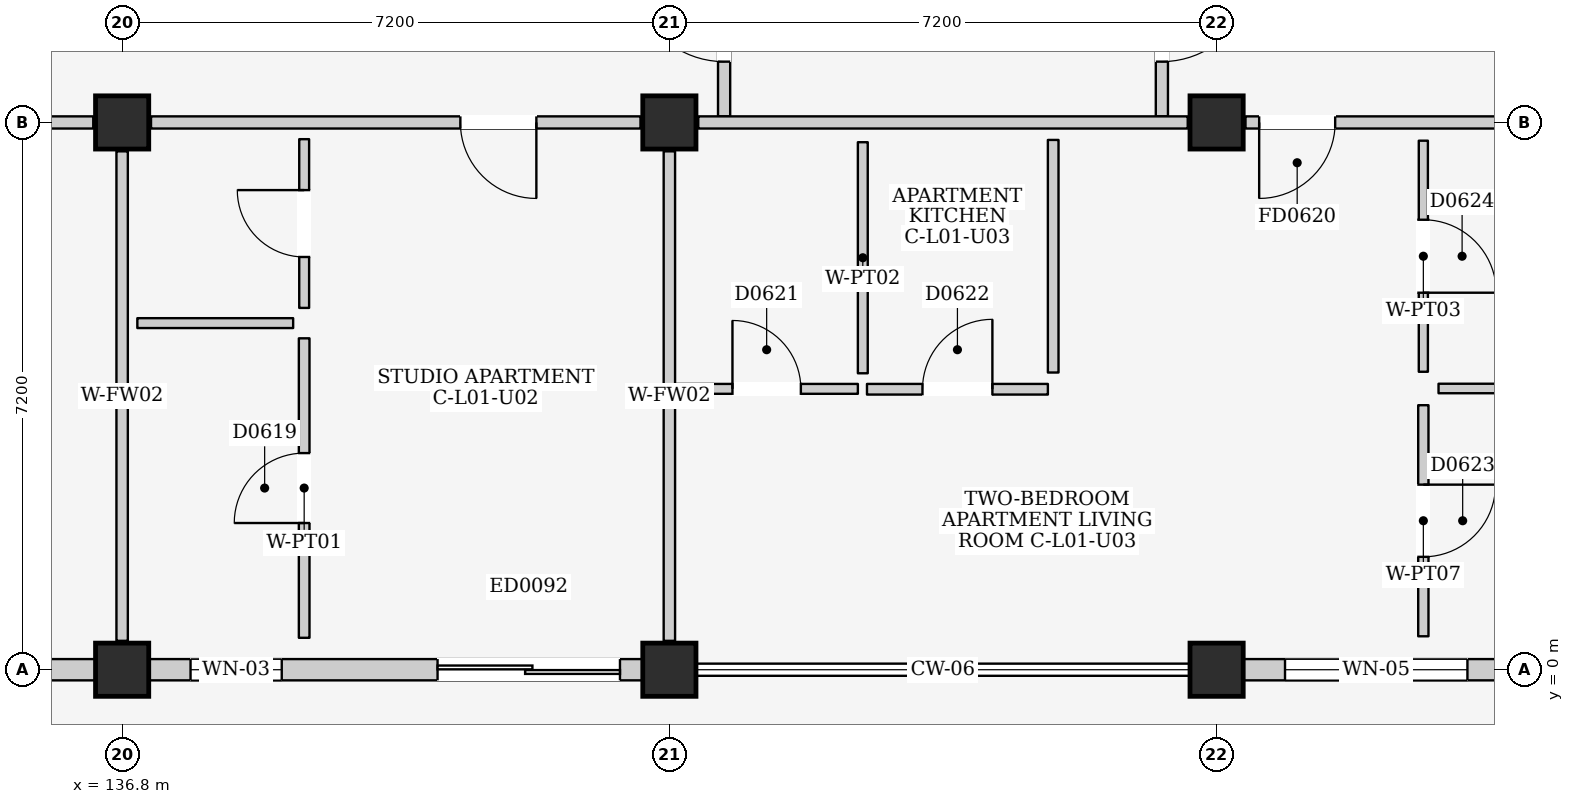
"""IFC4 building model, lengths in metres.
Left out: names, types, materials, properties, quantities, classifications, styles, units other than length and angle.
Written with IfcOpenShell. Run it as: python <this file> out.ifc"""

import sys

from ifc_helpers import new_model, si_unit, direction, frame, frame_2d, origin, origin_2d, place, context, subcontext, project, spatial, rectangle, extrude, element, fill, save


model = new_model("IFC4")
c1 = context("Model", 3, precision=1e-05, world=origin(), true_north=direction((0.0, 1.0)))
c2 = subcontext(c1, "Body", "Model", "MODEL_VIEW")
j1 = project(units=[si_unit("LENGTHUNIT", "METRE"), si_unit("PLANEANGLEUNIT", "RADIAN")], contexts=[c1])
p1 = place(None, origin())
s1 = spatial("IfcSite", under=j1, at=p1, CompositionType="ELEMENT")
p2 = place(p1, origin())
s2 = spatial("IfcBuilding", under=s1, at=p2, CompositionType="ELEMENT")
p3 = place(p2, frame((0.0, 0.0, 4.5)))
s3 = spatial("IfcBuildingStorey", under=s2, at=p3, CompositionType="ELEMENT", Elevation=4.5)
for number, where, z_axis, x_axis in (
    (1, (136.8, 0.0, 0.0), (0.0, 0.0, 1.0), (1.0, 0.0, 0.0)),
    (2, (136.8, 7.2, 0.0), (0.0, 0.0, 1.0), (1.0, 0.0, 0.0)),
    (3, (144.0, 0.0, 0.0), (0.0, 0.0, 1.0), (1.0, 0.0, 0.0)),
    (4, (144.0, 7.2, 0.0), (0.0, 0.0, 1.0), (1.0, 0.0, 0.0)),
    (5, (151.2, 0.0, 0.0), (0.0, 0.0, 1.0), (1.0, 0.0, 0.0)),
    (6, (151.2, 7.2, 0.0), (0.0, 0.0, 1.0), (1.0, 0.0, 0.0)),
):
    element("IfcColumn", number, at=place(p3, frame(where, z_axis=z_axis, x_axis=x_axis)), inside=s3, PredefinedType="COLUMN", context=c2, shape_type="SweptSolid", body=[
        extrude(rectangle(XDim=0.7, YDim=0.7, at=origin_2d()), origin(), (0.0, 0.0, 1.0), 4.5),
    ])
p4 = place(p3, frame((129.95, 0.0, 0.0), z_axis=(0.0, 0.0, 1.0), x_axis=(1.0, 0.0, 0.0)))
e7 = element("IfcWall", 7, at=p4, inside=s3, PredefinedType="ELEMENTEDWALL", context=c2, shape_type="SweptSolid", body=[
    extrude(rectangle(XDim=6.5, YDim=0.28, at=frame_2d((3.25, 0.0))), origin(), (0.0, 0.0, 1.0), 3.715),
])
p5 = place(p4, frame((3.85, 0.0, 0.0)))
e8 = element("IfcOpeningElement", 8, at=p5, cuts=e7, PredefinedType="OPENING", context=c2, shape_type="SweptSolid", body=[
    extrude(rectangle(XDim=1.5, YDim=2.12, at=frame_2d((0.75, 1.06))), frame((0.0, 0.155, 0.0), z_axis=(0.0, -1.0, 0.0), x_axis=(1.0, 0.0, 0.0)), (0.0, 0.0, 1.0), 0.31),
])
p6 = place(p4, frame((0.55, 0.0, 0.9)))
e9 = element("IfcOpeningElement", 9, at=p6, cuts=e7, PredefinedType="OPENING", context=c2, shape_type="SweptSolid", body=[
    extrude(rectangle(XDim=1.5, YDim=1.5, at=frame_2d((0.75, 0.75))), frame((0.0, 0.155, 0.0), z_axis=(0.0, -1.0, 0.0), x_axis=(1.0, 0.0, 0.0)), (0.0, 0.0, 1.0), 0.31),
])
p7 = place(p3, frame((137.15, 0.0, 0.0), z_axis=(0.0, 0.0, 1.0), x_axis=(1.0, 0.0, 0.0)))
e10 = element("IfcWall", 10, at=p7, inside=s3, PredefinedType="ELEMENTEDWALL", context=c2, shape_type="SweptSolid", body=[
    extrude(rectangle(XDim=6.5, YDim=0.28, at=frame_2d((3.25, 0.0))), origin(), (0.0, 0.0, 1.0), 3.715),
])
p8 = place(p7, frame((3.8, 0.0, 0.0)))
e11 = element("IfcOpeningElement", 11, at=p8, cuts=e10, PredefinedType="OPENING", context=c2, shape_type="SweptSolid", body=[
    extrude(rectangle(XDim=2.4, YDim=2.12, at=frame_2d((1.2, 1.06))), frame((0.0, 0.155, 0.0), z_axis=(0.0, -1.0, 0.0), x_axis=(1.0, 0.0, 0.0)), (0.0, 0.0, 1.0), 0.31),
])
p9 = place(p7, frame((0.55, 0.0, 0.9)))
e12 = element("IfcOpeningElement", 12, at=p9, cuts=e10, PredefinedType="OPENING", context=c2, shape_type="SweptSolid", body=[
    extrude(rectangle(XDim=1.2, YDim=1.35, at=frame_2d((0.6, 0.675))), frame((0.0, 0.155, 0.0), z_axis=(0.0, -1.0, 0.0), x_axis=(1.0, 0.0, 0.0)), (0.0, 0.0, 1.0), 0.31),
])
p10 = place(p3, frame((151.55, 0.0, 0.0), z_axis=(0.0, 0.0, 1.0), x_axis=(1.0, 0.0, 0.0)))
e13 = element("IfcWall", 13, at=p10, inside=s3, PredefinedType="ELEMENTEDWALL", context=c2, shape_type="SweptSolid", body=[
    extrude(rectangle(XDim=6.5, YDim=0.28, at=frame_2d((3.25, 0.0))), origin(), (0.0, 0.0, 1.0), 3.715),
])
p11 = place(p10, frame((3.85, 0.0, 0.0)))
e14 = element("IfcOpeningElement", 14, at=p11, cuts=e13, PredefinedType="OPENING", context=c2, shape_type="SweptSolid", body=[
    extrude(rectangle(XDim=1.4, YDim=2.1, at=frame_2d((0.7, 1.05))), frame((0.0, 0.155, 0.0), z_axis=(0.0, -1.0, 0.0), x_axis=(1.0, 0.0, 0.0)), (0.0, 0.0, 1.0), 0.31),
])
p12 = place(p10, frame((0.55, 0.0, 0.9)))
e15 = element("IfcOpeningElement", 15, at=p12, cuts=e13, PredefinedType="OPENING", context=c2, shape_type="SweptSolid", body=[
    extrude(rectangle(XDim=2.4, YDim=1.65, at=frame_2d((1.2, 0.825))), frame((0.0, 0.155, 0.0), z_axis=(0.0, -1.0, 0.0), x_axis=(1.0, 0.0, 0.0)), (0.0, 0.0, 1.0), 0.31),
])
p13 = place(p3, frame((144.72, 7.28, 0.0), z_axis=(0.0, 0.0, 1.0), x_axis=(0.0, 1.0, 0.0)))
e16 = element("IfcWall", 16, at=p13, inside=s3, PredefinedType="PARTITIONING", context=c2, shape_type="SweptSolid", body=[
    extrude(rectangle(XDim=4.32, YDim=0.16, at=frame_2d((2.16, 0.0))), origin(), (0.0, 0.0, 1.0), 4.25),
])
p14 = place(p13, frame((0.72, 0.0, 0.0)))
e17 = element("IfcOpeningElement", 17, at=p14, cuts=e16, PredefinedType="OPENING", context=c2, shape_type="SweptSolid", body=[
    extrude(rectangle(XDim=1.2, YDim=2.2, at=frame_2d((0.6, 1.1))), frame((0.0, 0.095, 0.0), z_axis=(0.0, -1.0, 0.0), x_axis=(1.0, 0.0, 0.0)), (0.0, 0.0, 1.0), 0.19),
])
p15 = place(p3, frame((150.48, 7.28, 0.0), z_axis=(0.0, 0.0, 1.0), x_axis=(0.0, 1.0, 0.0)))
e18 = element("IfcWall", 18, at=p15, inside=s3, PredefinedType="PARTITIONING", context=c2, shape_type="SweptSolid", body=[
    extrude(rectangle(XDim=4.32, YDim=0.16, at=frame_2d((2.16, 0.0))), origin(), (0.0, 0.0, 1.0), 4.25),
])
p16 = place(p15, frame((0.72, 0.0, 0.0)))
e19 = element("IfcOpeningElement", 19, at=p16, cuts=e18, PredefinedType="OPENING", context=c2, shape_type="SweptSolid", body=[
    extrude(rectangle(XDim=1.2, YDim=2.2, at=frame_2d((0.6, 1.1))), frame((0.0, 0.095, 0.0), z_axis=(0.0, -1.0, 0.0), x_axis=(1.0, 0.0, 0.0)), (0.0, 0.0, 1.0), 0.19),
])
p17 = place(p3, frame((129.98, 7.2, 0.0), z_axis=(0.0, 0.0, 1.0), x_axis=(1.0, 0.0, 0.0)))
e20 = element("IfcWall", 20, at=p17, inside=s3, PredefinedType="PARTITIONING", context=c2, shape_type="SweptSolid", body=[
    extrude(rectangle(XDim=6.44, YDim=0.16, at=frame_2d((3.22, 0.0))), origin(), (0.0, 0.0, 1.0), 3.635),
])
p18 = place(p3, frame((136.8, 0.38, 0.0), z_axis=(0.0, 0.0, 1.0), x_axis=(0.0, 1.0, 0.0)))
e21 = element("IfcWall", 21, at=p18, inside=s3, PredefinedType="PARTITIONING", context=c2, shape_type="SweptSolid", body=[
    extrude(rectangle(XDim=6.44, YDim=0.15, at=frame_2d((3.22, 0.0))), origin(), (0.0, 0.0, 1.0), 3.685),
])
p19 = place(p3, frame((137.18, 7.2, 0.0), z_axis=(0.0, 0.0, 1.0), x_axis=(1.0, 0.0, 0.0)))
e22 = element("IfcWall", 22, at=p19, inside=s3, PredefinedType="PARTITIONING", context=c2, shape_type="SweptSolid", body=[
    extrude(rectangle(XDim=6.44, YDim=0.16, at=frame_2d((3.22, 0.0))), origin(), (0.0, 0.0, 1.0), 3.635),
])
p20 = place(p19, frame((4.07, 0.0, 0.0)))
e23 = element("IfcOpeningElement", 23, at=p20, cuts=e22, PredefinedType="OPENING", context=c2, shape_type="SweptSolid", body=[
    extrude(rectangle(XDim=1.0, YDim=2.15, at=frame_2d((0.5, 1.075))), frame((0.0, 0.095, 0.0), z_axis=(0.0, -1.0, 0.0), x_axis=(1.0, 0.0, 0.0)), (0.0, 0.0, 1.0), 0.19),
])
p21 = place(p3, frame((144.0, 0.38, 0.0), z_axis=(0.0, 0.0, 1.0), x_axis=(0.0, 1.0, 0.0)))
e24 = element("IfcWall", 24, at=p21, inside=s3, PredefinedType="PARTITIONING", context=c2, shape_type="SweptSolid", body=[
    extrude(rectangle(XDim=6.44, YDim=0.15, at=frame_2d((3.22, 0.0))), origin(), (0.0, 0.0, 1.0), 3.685),
])
p22 = place(p3, frame((137.0, 4.56, 0.0), z_axis=(0.0, 0.0, 1.0), x_axis=(1.0, 0.0, 0.0)))
e25 = element("IfcWall", 25, at=p22, inside=s3, PredefinedType="PARTITIONING", context=c2, shape_type="SweptSolid", body=[
    extrude(rectangle(XDim=2.05, YDim=0.13, at=frame_2d((1.025, 0.0))), origin(), (0.0, 0.0, 1.0), 4.25),
])
p23 = place(p3, frame((139.195, 4.76, 0.0), z_axis=(0.0, 0.0, 1.0), x_axis=(0.0, 1.0, 0.0)))
e26 = element("IfcWall", 26, at=p23, inside=s3, PredefinedType="PARTITIONING", context=c2, shape_type="SweptSolid", body=[
    extrude(rectangle(XDim=2.22, YDim=0.13, at=frame_2d((1.11, 0.0))), origin(), (0.0, 0.0, 1.0), 4.25),
])
p24 = place(p23, frame((0.67, 0.0, 0.0)))
e27 = element("IfcOpeningElement", 27, at=p24, cuts=e26, PredefinedType="OPENING", context=c2, shape_type="SweptSolid", body=[
    extrude(rectangle(XDim=0.88, YDim=2.1, at=frame_2d((0.44, 1.05))), frame((0.0, 0.08, 0.0), z_axis=(0.0, -1.0, 0.0), x_axis=(1.0, 0.0, 0.0)), (0.0, 0.0, 1.0), 0.16),
])
p25 = place(p3, frame((139.195, 0.42, 0.0), z_axis=(0.0, 0.0, 1.0), x_axis=(0.0, 1.0, 0.0)))
e28 = element("IfcWall", 28, at=p25, inside=s3, PredefinedType="PARTITIONING", context=c2, shape_type="SweptSolid", body=[
    extrude(rectangle(XDim=3.94, YDim=0.14, at=frame_2d((1.97, 0.0))), origin(), (0.0, 0.0, 1.0), 4.25),
])
p26 = place(p25, frame((1.51, 0.0, 0.0)))
e29 = element("IfcOpeningElement", 29, at=p26, cuts=e28, PredefinedType="OPENING", context=c2, shape_type="SweptSolid", body=[
    extrude(rectangle(XDim=0.92, YDim=2.1, at=frame_2d((0.46, 1.05))), frame((0.0, 0.085, 0.0), z_axis=(0.0, -1.0, 0.0), x_axis=(1.0, 0.0, 0.0)), (0.0, 0.0, 1.0), 0.17),
])
p27 = place(p3, frame((144.38, 7.2, 0.0), z_axis=(0.0, 0.0, 1.0), x_axis=(1.0, 0.0, 0.0)))
e30 = element("IfcWall", 30, at=p27, inside=s3, PredefinedType="PARTITIONING", context=c2, shape_type="SweptSolid", body=[
    extrude(rectangle(XDim=6.44, YDim=0.16, at=frame_2d((3.22, 0.0))), origin(), (0.0, 0.0, 1.0), 3.635),
])
p28 = place(p3, frame((151.58, 7.2, 0.0), z_axis=(0.0, 0.0, 1.0), x_axis=(1.0, 0.0, 0.0)))
e31 = element("IfcWall", 31, at=p28, inside=s3, PredefinedType="PARTITIONING", context=c2, shape_type="SweptSolid", body=[
    extrude(rectangle(XDim=6.44, YDim=0.16, at=frame_2d((3.22, 0.0))), origin(), (0.0, 0.0, 1.0), 3.635),
])
p29 = place(p28, frame((0.18, 0.0, 0.0)))
e32 = element("IfcOpeningElement", 32, at=p29, cuts=e31, PredefinedType="OPENING", context=c2, shape_type="SweptSolid", body=[
    extrude(rectangle(XDim=1.0, YDim=2.15, at=frame_2d((0.5, 1.075))), frame((0.0, 0.095, 0.0), z_axis=(0.0, -1.0, 0.0), x_axis=(1.0, 0.0, 0.0)), (0.0, 0.0, 1.0), 0.19),
])
p30 = place(p3, frame((144.08, 3.695, 0.0), z_axis=(0.0, 0.0, 1.0), x_axis=(1.0, 0.0, 0.0)))
e33 = element("IfcWall", 33, at=p30, inside=s3, PredefinedType="PARTITIONING", context=c2, shape_type="SweptSolid", body=[
    extrude(rectangle(XDim=2.4, YDim=0.13, at=frame_2d((1.2, 0.0))), origin(), (0.0, 0.0, 1.0), 4.25),
])
p31 = place(p30, frame((0.75, 0.0, 0.0)))
e34 = element("IfcOpeningElement", 34, at=p31, cuts=e33, PredefinedType="OPENING", context=c2, shape_type="SweptSolid", body=[
    extrude(rectangle(XDim=0.9, YDim=2.1, at=frame_2d((0.45, 1.05))), frame((0.0, 0.08, 0.0), z_axis=(0.0, -1.0, 0.0), x_axis=(1.0, 0.0, 0.0)), (0.0, 0.0, 1.0), 0.16),
])
p32 = place(p3, frame((146.545, 3.9, 0.0), z_axis=(0.0, 0.0, 1.0), x_axis=(0.0, 1.0, 0.0)))
e35 = element("IfcWall", 35, at=p32, inside=s3, PredefinedType="PARTITIONING", context=c2, shape_type="SweptSolid", body=[
    extrude(rectangle(XDim=3.04, YDim=0.13, at=frame_2d((1.52, 0.0))), origin(), (0.0, 0.0, 1.0), 4.25),
])
p33 = place(p3, frame((146.6, 3.69, 0.0), z_axis=(0.0, 0.0, 1.0), x_axis=(1.0, 0.0, 0.0)))
e36 = element("IfcWall", 36, at=p33, inside=s3, PredefinedType="PARTITIONING", context=c2, shape_type="SweptSolid", body=[
    extrude(rectangle(XDim=2.38, YDim=0.14, at=frame_2d((1.19, 0.0))), origin(), (0.0, 0.0, 1.0), 4.25),
])
p34 = place(p33, frame((0.73, 0.0, 0.0)))
e37 = element("IfcOpeningElement", 37, at=p34, cuts=e36, PredefinedType="OPENING", context=c2, shape_type="SweptSolid", body=[
    extrude(rectangle(XDim=0.92, YDim=2.1, at=frame_2d((0.46, 1.05))), frame((0.0, 0.085, 0.0), z_axis=(0.0, -1.0, 0.0), x_axis=(1.0, 0.0, 0.0)), (0.0, 0.0, 1.0), 0.17),
])
p35 = place(p3, frame((149.05, 3.91, 0.0), z_axis=(0.0, 0.0, 1.0), x_axis=(0.0, 1.0, 0.0)))
e38 = element("IfcWall", 38, at=p35, inside=s3, PredefinedType="PARTITIONING", context=c2, shape_type="SweptSolid", body=[
    extrude(rectangle(XDim=3.06, YDim=0.14, at=frame_2d((1.53, 0.0))), origin(), (0.0, 0.0, 1.0), 4.25),
])
p36 = place(p3, frame((153.92, 0.44, 0.0), z_axis=(0.0, 0.0, 1.0), x_axis=(0.0, 1.0, 0.0)))
e39 = element("IfcWall", 39, at=p36, inside=s3, PredefinedType="PARTITIONING", context=c2, shape_type="SweptSolid", body=[
    extrude(rectangle(XDim=3.04, YDim=0.135, at=frame_2d((1.52, 0.0))), origin(), (0.0, 0.0, 1.0), 4.25),
])
p37 = place(p36, frame((1.045, 0.0, 0.0)))
e40 = element("IfcOpeningElement", 40, at=p37, cuts=e39, PredefinedType="OPENING", context=c2, shape_type="SweptSolid", body=[
    extrude(rectangle(XDim=0.95, YDim=2.15, at=frame_2d((0.475, 1.075))), frame((0.0, 0.083, 0.0), z_axis=(0.0, -1.0, 0.0), x_axis=(1.0, 0.0, 0.0)), (0.0, 0.0, 1.0), 0.165),
])
p38 = place(p3, frame((154.12, 3.7, 0.0), z_axis=(0.0, 0.0, 1.0), x_axis=(1.0, 0.0, 0.0)))
e41 = element("IfcWall", 41, at=p38, inside=s3, PredefinedType="PARTITIONING", context=c2, shape_type="SweptSolid", body=[
    extrude(rectangle(XDim=4.06, YDim=0.125, at=frame_2d((2.03, 0.0))), origin(), (0.0, 0.0, 1.0), 4.25),
])
p39 = place(p3, frame((153.92, 3.92, 0.0), z_axis=(0.0, 0.0, 1.0), x_axis=(0.0, 1.0, 0.0)))
e42 = element("IfcWall", 42, at=p39, inside=s3, PredefinedType="PARTITIONING", context=c2, shape_type="SweptSolid", body=[
    extrude(rectangle(XDim=3.04, YDim=0.12, at=frame_2d((1.52, 0.0))), origin(), (0.0, 0.0, 1.0), 4.25),
])
p40 = place(p39, frame((1.04, 0.0, 0.0)))
e43 = element("IfcOpeningElement", 43, at=p40, cuts=e42, PredefinedType="OPENING", context=c2, shape_type="SweptSolid", body=[
    extrude(rectangle(XDim=0.96, YDim=2.15, at=frame_2d((0.48, 1.075))), frame((0.0, 0.075, 0.0), z_axis=(0.0, -1.0, 0.0), x_axis=(1.0, 0.0, 0.0)), (0.0, 0.0, 1.0), 0.15),
])
p41 = place(p8, frame((2.4, 0.0, 0.0), z_axis=(0.0, 0.0, 1.0), x_axis=(-1.0, 0.0, 0.0)))
e44 = element("IfcDoor", 44, at=p41, inside=s3, OperationType="DOUBLE_DOOR_SLIDING", PredefinedType="DOOR", context=c2, shape_type="SweptSolid", body=[
    extrude(rectangle(XDim=2.4, YDim=2.12, at=frame_2d((1.2, 1.06))), frame((0.0, 0.025, 0.0), z_axis=(0.0, -1.0, 0.0), x_axis=(1.0, 0.0, 0.0)), (0.0, 0.0, 1.0), 0.05),
])
fill(e11, e44)
p42 = place(p9, origin())
e45 = element("IfcWindow", 45, at=p42, inside=s3, PartitioningType="SINGLE_PANEL", PredefinedType="WINDOW", context=c2, shape_type="SweptSolid", body=[
    extrude(rectangle(XDim=1.2, YDim=1.35, at=frame_2d((0.6, 0.675))), frame((0.0, 0.03, 0.0), z_axis=(0.0, -1.0, 0.0), x_axis=(1.0, 0.0, 0.0)), (0.0, 0.0, 1.0), 0.06),
])
fill(e12, e45)
p43 = place(p12, origin())
e46 = element("IfcWindow", 46, at=p43, inside=s3, PartitioningType="TRIPLE_PANEL_VERTICAL", PredefinedType="WINDOW", context=c2, shape_type="SweptSolid", body=[
    extrude(rectangle(XDim=2.4, YDim=1.65, at=frame_2d((1.2, 0.825))), frame((0.0, 0.03, 0.0), z_axis=(0.0, -1.0, 0.0), x_axis=(1.0, 0.0, 0.0)), (0.0, 0.0, 1.0), 0.06),
])
fill(e15, e46)
p44 = place(p14, origin())
e47 = element("IfcDoor", 47, at=p44, inside=s3, OperationType="SINGLE_SWING_RIGHT", PredefinedType="DOOR", context=c2, shape_type="SweptSolid", body=[
    extrude(rectangle(XDim=1.2, YDim=2.2, at=frame_2d((0.6, 1.1))), frame((0.0, 0.025, 0.0), z_axis=(0.0, -1.0, 0.0), x_axis=(1.0, 0.0, 0.0)), (0.0, 0.0, 1.0), 0.05),
])
fill(e17, e47)
p45 = place(p16, frame((1.2, 0.0, 0.0), z_axis=(0.0, 0.0, 1.0), x_axis=(-1.0, 0.0, 0.0)))
e48 = element("IfcDoor", 48, at=p45, inside=s3, OperationType="SINGLE_SWING_LEFT", PredefinedType="DOOR", context=c2, shape_type="SweptSolid", body=[
    extrude(rectangle(XDim=1.2, YDim=2.2, at=frame_2d((0.6, 1.1))), frame((0.0, 0.025, 0.0), z_axis=(0.0, -1.0, 0.0), x_axis=(1.0, 0.0, 0.0)), (0.0, 0.0, 1.0), 0.05),
])
fill(e19, e48)
p46 = place(p20, frame((1.0, 0.0, 0.0), z_axis=(0.0, 0.0, 1.0), x_axis=(-1.0, 0.0, 0.0)))
e49 = element("IfcDoor", 49, at=p46, inside=s3, OperationType="SINGLE_SWING_LEFT", PredefinedType="DOOR", context=c2, shape_type="SweptSolid", body=[
    extrude(rectangle(XDim=1.0, YDim=2.15, at=frame_2d((0.5, 1.075))), frame((0.0, 0.025, 0.0), z_axis=(0.0, -1.0, 0.0), x_axis=(1.0, 0.0, 0.0)), (0.0, 0.0, 1.0), 0.05),
])
fill(e23, e49)
p47 = place(p24, origin())
e50 = element("IfcDoor", 50, at=p47, inside=s3, OperationType="SINGLE_SWING_RIGHT", PredefinedType="DOOR", context=c2, shape_type="SweptSolid", body=[
    extrude(rectangle(XDim=0.88, YDim=2.1, at=frame_2d((0.44, 1.05))), frame((0.0, 0.025, 0.0), z_axis=(0.0, -1.0, 0.0), x_axis=(1.0, 0.0, 0.0)), (0.0, 0.0, 1.0), 0.05),
])
fill(e27, e50)
p48 = place(p26, origin())
e51 = element("IfcDoor", 51, at=p48, inside=s3, OperationType="SINGLE_SWING_LEFT", PredefinedType="DOOR", context=c2, shape_type="SweptSolid", body=[
    extrude(rectangle(XDim=0.92, YDim=2.1, at=frame_2d((0.46, 1.05))), frame((0.0, 0.025, 0.0), z_axis=(0.0, -1.0, 0.0), x_axis=(1.0, 0.0, 0.0)), (0.0, 0.0, 1.0), 0.05),
])
fill(e29, e51)
p49 = place(p29, frame((1.0, 0.0, 0.0), z_axis=(0.0, 0.0, 1.0), x_axis=(-1.0, 0.0, 0.0)))
e52 = element("IfcDoor", 52, at=p49, inside=s3, OperationType="SINGLE_SWING_RIGHT", PredefinedType="DOOR", context=c2, shape_type="SweptSolid", body=[
    extrude(rectangle(XDim=1.0, YDim=2.15, at=frame_2d((0.5, 1.075))), frame((0.0, 0.025, 0.0), z_axis=(0.0, -1.0, 0.0), x_axis=(1.0, 0.0, 0.0)), (0.0, 0.0, 1.0), 0.05),
])
fill(e32, e52)
p50 = place(p31, origin())
e53 = element("IfcDoor", 53, at=p50, inside=s3, OperationType="SINGLE_SWING_LEFT", PredefinedType="DOOR", context=c2, shape_type="SweptSolid", body=[
    extrude(rectangle(XDim=0.9, YDim=2.1, at=frame_2d((0.45, 1.05))), frame((0.0, 0.025, 0.0), z_axis=(0.0, -1.0, 0.0), x_axis=(1.0, 0.0, 0.0)), (0.0, 0.0, 1.0), 0.05),
])
fill(e34, e53)
p51 = place(p34, origin())
e54 = element("IfcDoor", 54, at=p51, inside=s3, OperationType="SINGLE_SWING_RIGHT", PredefinedType="DOOR", context=c2, shape_type="SweptSolid", body=[
    extrude(rectangle(XDim=0.92, YDim=2.1, at=frame_2d((0.46, 1.05))), frame((0.0, 0.025, 0.0), z_axis=(0.0, -1.0, 0.0), x_axis=(1.0, 0.0, 0.0)), (0.0, 0.0, 1.0), 0.05),
])
fill(e37, e54)
p52 = place(p37, frame((0.95, 0.0, 0.0), z_axis=(0.0, 0.0, 1.0), x_axis=(-1.0, 0.0, 0.0)))
e55 = element("IfcDoor", 55, at=p52, inside=s3, OperationType="SINGLE_SWING_LEFT", PredefinedType="DOOR", context=c2, shape_type="SweptSolid", body=[
    extrude(rectangle(XDim=0.95, YDim=2.15, at=frame_2d((0.475, 1.075))), frame((0.0, 0.025, 0.0), z_axis=(0.0, -1.0, 0.0), x_axis=(1.0, 0.0, 0.0)), (0.0, 0.0, 1.0), 0.05),
])
fill(e40, e55)
p53 = place(p40, frame((0.96, 0.0, 0.0), z_axis=(0.0, 0.0, 1.0), x_axis=(-1.0, 0.0, 0.0)))
e56 = element("IfcDoor", 56, at=p53, inside=s3, OperationType="SINGLE_SWING_RIGHT", PredefinedType="DOOR", context=c2, shape_type="SweptSolid", body=[
    extrude(rectangle(XDim=0.96, YDim=2.15, at=frame_2d((0.48, 1.075))), frame((0.0, 0.025, 0.0), z_axis=(0.0, -1.0, 0.0), x_axis=(1.0, 0.0, 0.0)), (0.0, 0.0, 1.0), 0.05),
])
fill(e43, e56)
save(model, sys.argv[1])
